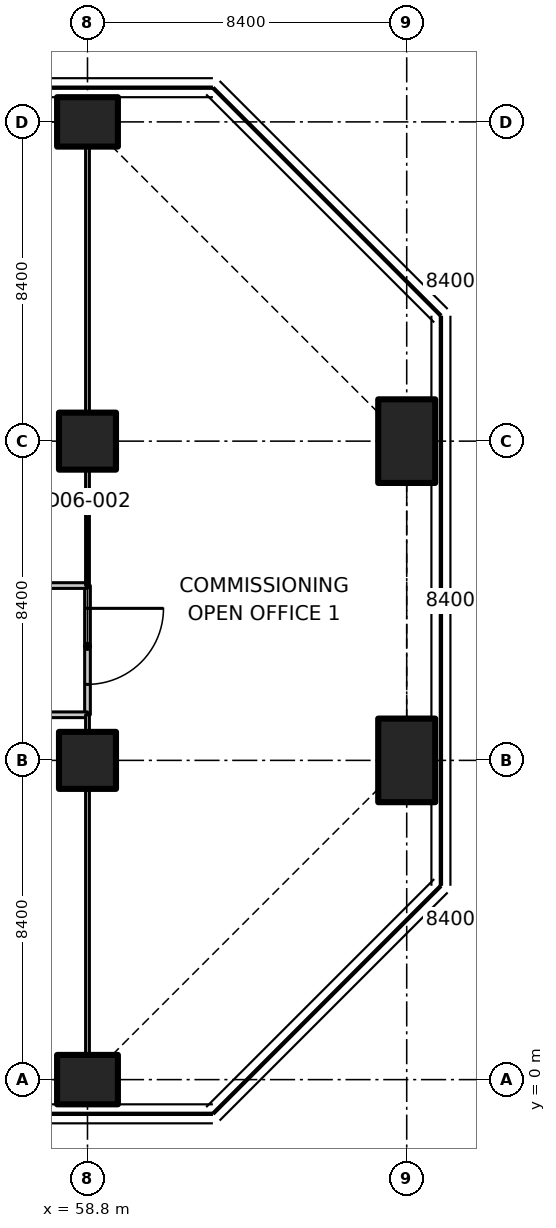
"""IFC4 building model, lengths in metres.
Left out: names, types, materials, properties, quantities, classifications, styles, units other than length and angle.
Written with IfcOpenShell. Run it as: python <this file> out.ifc"""

import sys

from ifc_helpers import new_model, si_unit, direction, frame, frame_2d, origin, origin_2d, place, context, subcontext, project, spatial, rectangle, extrude, element, fill, save


model = new_model("IFC4")
c1 = context("Model", 3, precision=1e-05, world=origin(), true_north=direction((0.0, 1.0)))
c2 = subcontext(c1, "Body", "Model", "MODEL_VIEW")
j1 = project(units=[si_unit("LENGTHUNIT", "METRE"), si_unit("PLANEANGLEUNIT", "RADIAN")], contexts=[c1])
p1 = place(None, origin())
s1 = spatial("IfcSite", under=j1, at=p1, CompositionType="ELEMENT")
p2 = place(p1, origin())
s2 = spatial("IfcBuilding", under=s1, at=p2, CompositionType="ELEMENT")
p3 = place(p2, frame((0.0, 0.0, 32.0)))
s3 = spatial("IfcBuildingStorey", under=s2, at=p3, CompositionType="ELEMENT", Elevation=32.0)
p4 = place(p3, frame((58.8, 0.0, 0.0), z_axis=(0.0, 0.0, 1.0), x_axis=(0.0, 1.0, 0.0)))
e1 = element("IfcColumn", 1, at=p4, inside=s3, PredefinedType="COLUMN", context=c2, shape_type="SweptSolid", body=[
    extrude(rectangle(XDim=1.3, YDim=1.6, at=origin_2d()), origin(), (0.0, 0.0, 1.0), 4.25),
])
for number, where, z_axis, x_axis in (
    (2, (58.8, 8.4, 0.0), (0.0, 0.0, 1.0), (1.0, 0.0, 0.0)),
    (3, (58.8, 16.8, 0.0), (0.0, 0.0, 1.0), (1.0, 0.0, 0.0)),
):
    element("IfcColumn", number, at=place(p3, frame(where, z_axis=z_axis, x_axis=x_axis)), inside=s3, PredefinedType="COLUMN", context=c2, shape_type="SweptSolid", body=[
        extrude(rectangle(XDim=1.5, YDim=1.5, at=origin_2d()), origin(), (0.0, 0.0, 1.0), 4.25),
    ])
p5 = place(p3, frame((58.8, 25.2, 0.0), z_axis=(0.0, 0.0, 1.0), x_axis=(0.0, 1.0, 0.0)))
e4 = element("IfcColumn", 4, at=p5, inside=s3, PredefinedType="COLUMN", context=c2, shape_type="SweptSolid", body=[
    extrude(rectangle(XDim=1.3, YDim=1.6, at=origin_2d()), origin(), (0.0, 0.0, 1.0), 4.25),
])
for number, where, z_axis, x_axis in (
    (5, (67.2, 8.4, 0.0), (0.0, 0.0, 1.0), (1.0, 0.0, 0.0)),
    (6, (67.2, 16.8, 0.0), (0.0, 0.0, 1.0), (1.0, 0.0, 0.0)),
):
    element("IfcColumn", number, at=place(p3, frame(where, z_axis=z_axis, x_axis=x_axis)), inside=s3, PredefinedType="COLUMN", context=c2, shape_type="SweptSolid", body=[
        extrude(rectangle(XDim=1.5, YDim=2.2, at=origin_2d()), origin(), (0.0, 0.0, 1.0), 4.25),
    ])
p6 = place(p3, frame((58.8, 13.0, 0.0), z_axis=(0.0, 0.0, 1.0), x_axis=(0.0, -1.0, 0.0)))
e7 = element("IfcWall", 7, at=p6, inside=s3, PredefinedType="PARTITIONING", context=c2, shape_type="SweptSolid", body=[
    extrude(rectangle(XDim=3.4, YDim=0.15, at=frame_2d((1.7, 0.0))), origin(), (0.0, 0.0, 1.0), 4.23),
])
p7 = place(p6, frame((0.6, 0.0, 0.0)))
e8 = element("IfcOpeningElement", 8, at=p7, cuts=e7, PredefinedType="OPENING", context=c2, shape_type="SweptSolid", body=[
    extrude(rectangle(XDim=2.0, YDim=2.4, at=frame_2d((1.0, 1.2))), frame((0.0, 0.085, 0.0), z_axis=(0.0, -1.0, 0.0), x_axis=(1.0, 0.0, 0.0)), (0.0, 0.0, 1.0), 0.17),
])
p8 = place(p3, frame((58.8, 9.6, 0.0), z_axis=(0.0, 0.0, 1.0), x_axis=(-1.0, 0.0, 0.0)))
e9 = element("IfcWall", 9, at=p8, inside=s3, PredefinedType="PARTITIONING", context=c2, shape_type="SweptSolid", body=[
    extrude(rectangle(XDim=8.4, YDim=0.15, at=frame_2d((4.2, 0.0))), origin(), (0.0, 0.0, 1.0), 4.23),
])
p9 = place(p8, frame((3.3, 0.0, 0.0)))
e10 = element("IfcOpeningElement", 10, at=p9, cuts=e9, PredefinedType="OPENING", context=c2, shape_type="SweptSolid", body=[
    extrude(rectangle(XDim=1.6, YDim=2.1, at=frame_2d((0.8, 1.05))), frame((0.0, 0.085, 0.0), z_axis=(0.0, -1.0, 0.0), x_axis=(1.0, 0.0, 0.0)), (0.0, 0.0, 1.0), 0.17),
])
p10 = place(p3, frame((54.6, 13.0, 0.0), z_axis=(0.0, 0.0, 1.0), x_axis=(1.0, 0.0, 0.0)))
e11 = element("IfcWall", 11, at=p10, inside=s3, PredefinedType="PARTITIONING", context=c2, shape_type="SweptSolid", body=[
    extrude(rectangle(XDim=4.2, YDim=0.15, at=frame_2d((2.1, 0.0))), origin(), (0.0, 0.0, 1.0), 4.23),
])
p11 = place(p10, frame((1.5, 0.0, 0.0)))
e12 = element("IfcOpeningElement", 12, at=p11, cuts=e11, PredefinedType="OPENING", context=c2, shape_type="SweptSolid", body=[
    extrude(rectangle(XDim=1.1, YDim=2.1, at=frame_2d((0.55, 1.05))), frame((0.0, 0.085, 0.0), z_axis=(0.0, -1.0, 0.0), x_axis=(1.0, 0.0, 0.0)), (0.0, 0.0, 1.0), 0.17),
])
p12 = place(p3, frame((58.8, 0.67, 0.0), z_axis=(0.0, 0.0, 1.0), x_axis=(0.0, 1.0, 0.0)))
e13 = element("IfcWall", 13, at=p12, inside=s3, PredefinedType="PARTITIONING", context=c2, shape_type="SweptSolid", body=[
    extrude(rectangle(XDim=6.96, YDim=0.1, at=frame_2d((3.48, 0.0))), origin(), (0.0, 0.0, 1.0), 4.23),
])
p13 = place(p3, frame((58.8, 9.17, 0.0), z_axis=(0.0, 0.0, 1.0), x_axis=(0.0, 1.0, 0.0)))
e14 = element("IfcWall", 14, at=p13, inside=s3, PredefinedType="PARTITIONING", context=c2, shape_type="SweptSolid", body=[
    extrude(rectangle(XDim=0.43, YDim=0.1, at=frame_2d((0.215, 0.0))), origin(), (0.0, 0.0, 1.0), 4.23),
])
p14 = place(p3, frame((58.8, 13.0, 0.0), z_axis=(0.0, 0.0, 1.0), x_axis=(0.0, 1.0, 0.0)))
e15 = element("IfcWall", 15, at=p14, inside=s3, PredefinedType="PARTITIONING", context=c2, shape_type="SweptSolid", body=[
    extrude(rectangle(XDim=3.03, YDim=0.1, at=frame_2d((1.515, 0.0))), origin(), (0.0, 0.0, 1.0), 4.23),
])
p15 = place(p3, frame((58.8, 17.57, 0.0), z_axis=(0.0, 0.0, 1.0), x_axis=(0.0, 1.0, 0.0)))
e16 = element("IfcWall", 16, at=p15, inside=s3, PredefinedType="PARTITIONING", context=c2, shape_type="SweptSolid", body=[
    extrude(rectangle(XDim=6.96, YDim=0.1, at=frame_2d((3.48, 0.0))), origin(), (0.0, 0.0, 1.0), 4.23),
])
p16 = place(p7, origin())
e17 = element("IfcDoor", 17, at=p16, inside=s3, OperationType="DOUBLE_DOOR_SINGLE_SWING", PredefinedType="DOOR", context=c2, shape_type="SweptSolid", body=[
    extrude(rectangle(XDim=2.0, YDim=2.4, at=frame_2d((1.0, 1.2))), frame((0.0, 0.025, 0.0), z_axis=(0.0, -1.0, 0.0), x_axis=(1.0, 0.0, 0.0)), (0.0, 0.0, 1.0), 0.05),
])
fill(e8, e17)
save(model, sys.argv[1])
